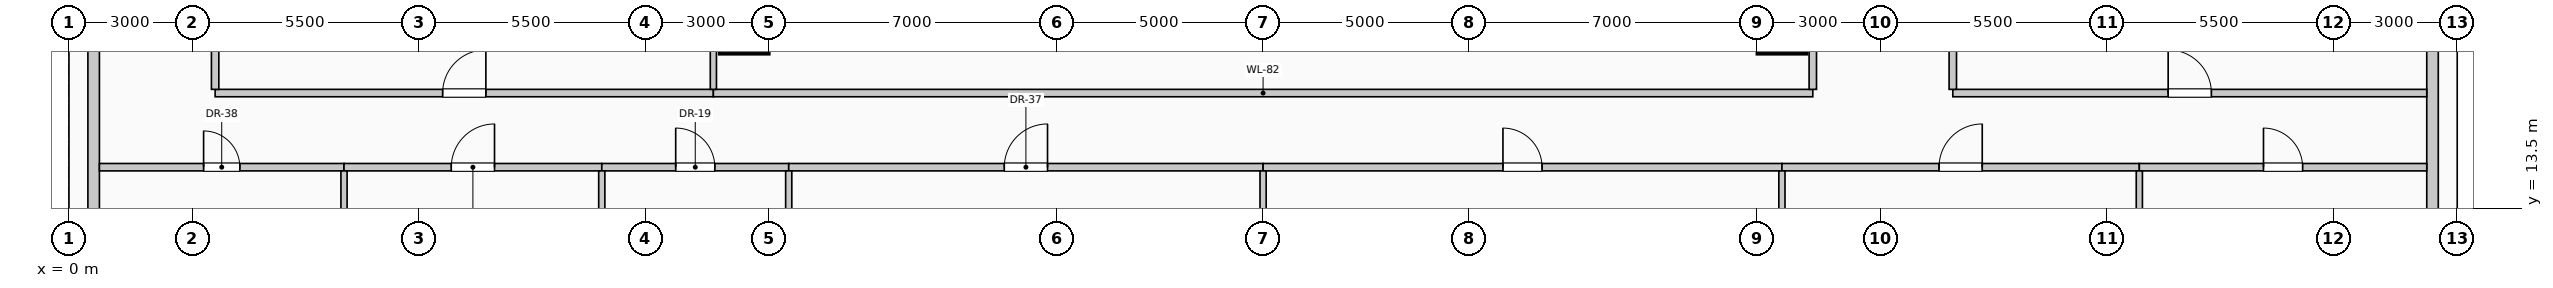
"""IFC4 building model, lengths in metres.
Left out: names, types, materials, properties, quantities, classifications, styles, units other than length and angle.
Written with IfcOpenShell. Run it as: python <this file> out.ifc"""

import sys

from ifc_helpers import new_model, si_unit, direction, frame, frame_2d, origin, origin_2d, place, context, subcontext, project, spatial, rectangle, extrude, element, fill, save


model = new_model("IFC4")
c1 = context("Model", 3, precision=1e-05, world=origin(), true_north=direction((0.0, 1.0)))
c2 = subcontext(c1, "Body", "Model", "MODEL_VIEW")
j1 = project(units=[si_unit("LENGTHUNIT", "METRE"), si_unit("PLANEANGLEUNIT", "RADIAN")], contexts=[c1])
p1 = place(None, origin())
s1 = spatial("IfcSite", under=j1, at=p1, CompositionType="ELEMENT")
p2 = place(p1, origin())
s2 = spatial("IfcBuilding", under=s1, at=p2, CompositionType="ELEMENT")
p3 = place(p2, frame((0.0, 0.0, 54.6)))
s3 = spatial("IfcBuildingStorey", under=s2, at=p3, CompositionType="ELEMENT", Elevation=54.6)
for number, where, z_axis, x_axis in (
    (1, (16.4, 18.0, 0.0), (0.0, 0.0, 1.0), (1.0, 0.0, 0.0)),
    (2, (41.6, 18.0, 0.0), (0.0, 0.0, 1.0), (1.0, 0.0, 0.0)),
):
    element("IfcColumn", number, at=place(p3, frame(where, z_axis=z_axis, x_axis=x_axis)), inside=s3, PredefinedType="COLUMN", context=c2, shape_type="SweptSolid", body=[
        extrude(rectangle(XDim=1.2, YDim=1.5, at=origin_2d()), origin(), (0.0, 0.0, 1.0), 4.0),
    ])
p4 = place(p3, frame((0.6, 10.47, 0.0), z_axis=(0.0, 0.0, 1.0), x_axis=(0.0, 1.0, 0.0)))
e3 = element("IfcWall", 3, at=p4, inside=s3, PredefinedType="SOLIDWALL", context=c2, shape_type="SweptSolid", body=[
    extrude(rectangle(XDim=7.06, YDim=0.28, at=frame_2d((3.53, 0.0))), origin(), (0.0, 0.0, 1.0), 2.85),
])
p5 = place(p4, frame((1.22, 0.0, 0.5)))
e4 = element("IfcOpeningElement", 4, at=p5, cuts=e3, PredefinedType="OPENING", context=c2, shape_type="SweptSolid", body=[
    extrude(rectangle(XDim=1.7, YDim=1.95, at=frame_2d((0.85, 0.975))), frame((0.0, 0.15, 0.0), z_axis=(0.0, -1.0, 0.0), x_axis=(1.0, 0.0, 0.0)), (0.0, 0.0, 1.0), 0.3),
])
p6 = place(p3, frame((57.4, 17.53, 0.0), z_axis=(0.0, 0.0, 1.0), x_axis=(0.0, -1.0, 0.0)))
e5 = element("IfcWall", 5, at=p6, inside=s3, PredefinedType="SOLIDWALL", context=c2, shape_type="SweptSolid", body=[
    extrude(rectangle(XDim=7.06, YDim=0.28, at=frame_2d((3.53, 0.0))), origin(), (0.0, 0.0, 1.0), 2.85),
])
p7 = place(p6, frame((4.14, 0.0, 0.5)))
e6 = element("IfcOpeningElement", 6, at=p7, cuts=e5, PredefinedType="OPENING", context=c2, shape_type="SweptSolid", body=[
    extrude(rectangle(XDim=1.7, YDim=1.95, at=frame_2d((0.85, 0.975))), frame((0.0, 0.15, 0.0), z_axis=(0.0, -1.0, 0.0), x_axis=(1.0, 0.0, 0.0)), (0.0, 0.0, 1.0), 0.3),
])
p8 = place(p3, frame((0.74, 14.5, 0.0), z_axis=(0.0, 0.0, 1.0), x_axis=(1.0, 0.0, 0.0)))
e7 = element("IfcWall", 7, at=p8, inside=s3, PredefinedType="PARTITIONING", context=c2, shape_type="SweptSolid", body=[
    extrude(rectangle(XDim=5.94, YDim=0.18, at=frame_2d((2.97, 0.0))), origin(), (0.0, 0.0, 1.0), 3.7),
])
p9 = place(p8, frame((2.53, 0.0, 0.0)))
e8 = element("IfcOpeningElement", 8, at=p9, cuts=e7, PredefinedType="OPENING", context=c2, shape_type="SweptSolid", body=[
    extrude(rectangle(XDim=0.88, YDim=2.1, at=frame_2d((0.44, 1.05))), frame((0.0, 0.1, 0.0), z_axis=(0.0, -1.0, 0.0), x_axis=(1.0, 0.0, 0.0)), (0.0, 0.0, 1.0), 0.2),
])
p10 = place(p3, frame((6.68, 14.5, 0.0), z_axis=(0.0, 0.0, 1.0), x_axis=(1.0, 0.0, 0.0)))
e9 = element("IfcWall", 9, at=p10, inside=s3, PredefinedType="PARTITIONING", context=c2, shape_type="SweptSolid", body=[
    extrude(rectangle(XDim=6.26, YDim=0.18, at=frame_2d((3.13, 0.0))), origin(), (0.0, 0.0, 1.0), 3.7),
])
p11 = place(p10, frame((2.605, 0.0, 0.0)))
e10 = element("IfcOpeningElement", 10, at=p11, cuts=e9, PredefinedType="OPENING", context=c2, shape_type="SweptSolid", body=[
    extrude(rectangle(XDim=1.05, YDim=2.15, at=frame_2d((0.525, 1.075))), frame((0.0, 0.1, 0.0), z_axis=(0.0, -1.0, 0.0), x_axis=(1.0, 0.0, 0.0)), (0.0, 0.0, 1.0), 0.2),
])
p12 = place(p3, frame((12.94, 14.5, 0.0), z_axis=(0.0, 0.0, 1.0), x_axis=(1.0, 0.0, 0.0)))
e11 = element("IfcWall", 11, at=p12, inside=s3, PredefinedType="PARTITIONING", context=c2, shape_type="SweptSolid", body=[
    extrude(rectangle(XDim=4.54, YDim=0.18, at=frame_2d((2.27, 0.0))), origin(), (0.0, 0.0, 1.0), 3.7),
])
p13 = place(p12, frame((1.795, 0.0, 0.0)))
e12 = element("IfcOpeningElement", 12, at=p13, cuts=e11, PredefinedType="OPENING", context=c2, shape_type="SweptSolid", body=[
    extrude(rectangle(XDim=0.95, YDim=2.15, at=frame_2d((0.475, 1.075))), frame((0.0, 0.1, 0.0), z_axis=(0.0, -1.0, 0.0), x_axis=(1.0, 0.0, 0.0)), (0.0, 0.0, 1.0), 0.2),
])
p14 = place(p3, frame((17.48, 14.5, 0.0), z_axis=(0.0, 0.0, 1.0), x_axis=(1.0, 0.0, 0.0)))
e13 = element("IfcWall", 13, at=p14, inside=s3, PredefinedType="PARTITIONING", context=c2, shape_type="SweptSolid", body=[
    extrude(rectangle(XDim=11.52, YDim=0.18, at=frame_2d((5.76, 0.0))), origin(), (0.0, 0.0, 1.0), 3.7),
])
p15 = place(p14, frame((5.235, 0.0, 0.0)))
e14 = element("IfcOpeningElement", 14, at=p15, cuts=e13, PredefinedType="OPENING", context=c2, shape_type="SweptSolid", body=[
    extrude(rectangle(XDim=1.05, YDim=2.15, at=frame_2d((0.525, 1.075))), frame((0.0, 0.1, 0.0), z_axis=(0.0, -1.0, 0.0), x_axis=(1.0, 0.0, 0.0)), (0.0, 0.0, 1.0), 0.2),
])
p16 = place(p3, frame((29.0, 14.5, 0.0), z_axis=(0.0, 0.0, 1.0), x_axis=(1.0, 0.0, 0.0)))
e15 = element("IfcWall", 15, at=p16, inside=s3, PredefinedType="PARTITIONING", context=c2, shape_type="SweptSolid", body=[
    extrude(rectangle(XDim=12.6, YDim=0.18, at=frame_2d((6.3, 0.0))), origin(), (0.0, 0.0, 1.0), 3.7),
])
p17 = place(p16, frame((5.825, 0.0, 0.0)))
e16 = element("IfcOpeningElement", 16, at=p17, cuts=e15, PredefinedType="OPENING", context=c2, shape_type="SweptSolid", body=[
    extrude(rectangle(XDim=0.95, YDim=2.15, at=frame_2d((0.475, 1.075))), frame((0.0, 0.1, 0.0), z_axis=(0.0, -1.0, 0.0), x_axis=(1.0, 0.0, 0.0)), (0.0, 0.0, 1.0), 0.2),
])
p18 = place(p3, frame((41.6, 14.5, 0.0), z_axis=(0.0, 0.0, 1.0), x_axis=(1.0, 0.0, 0.0)))
e17 = element("IfcWall", 17, at=p18, inside=s3, PredefinedType="PARTITIONING", context=c2, shape_type="SweptSolid", body=[
    extrude(rectangle(XDim=8.68, YDim=0.18, at=frame_2d((4.34, 0.0))), origin(), (0.0, 0.0, 1.0), 3.7),
])
p19 = place(p18, frame((3.815, 0.0, 0.0)))
e18 = element("IfcOpeningElement", 18, at=p19, cuts=e17, PredefinedType="OPENING", context=c2, shape_type="SweptSolid", body=[
    extrude(rectangle(XDim=1.05, YDim=2.15, at=frame_2d((0.525, 1.075))), frame((0.0, 0.1, 0.0), z_axis=(0.0, -1.0, 0.0), x_axis=(1.0, 0.0, 0.0)), (0.0, 0.0, 1.0), 0.2),
])
p20 = place(p3, frame((50.28, 14.5, 0.0), z_axis=(0.0, 0.0, 1.0), x_axis=(1.0, 0.0, 0.0)))
e19 = element("IfcWall", 19, at=p20, inside=s3, PredefinedType="PARTITIONING", context=c2, shape_type="SweptSolid", body=[
    extrude(rectangle(XDim=6.98, YDim=0.18, at=frame_2d((3.49, 0.0))), origin(), (0.0, 0.0, 1.0), 3.7),
])
p21 = place(p20, frame((3.015, 0.0, 0.0)))
e20 = element("IfcOpeningElement", 20, at=p21, cuts=e19, PredefinedType="OPENING", context=c2, shape_type="SweptSolid", body=[
    extrude(rectangle(XDim=0.95, YDim=2.15, at=frame_2d((0.475, 1.075))), frame((0.0, 0.1, 0.0), z_axis=(0.0, -1.0, 0.0), x_axis=(1.0, 0.0, 0.0)), (0.0, 0.0, 1.0), 0.2),
])
p22 = place(p3, frame((3.55, 16.3, 0.0), z_axis=(0.0, 0.0, 1.0), x_axis=(1.0, 0.0, 0.0)))
e21 = element("IfcWall", 21, at=p22, inside=s3, PredefinedType="PARTITIONING", context=c2, shape_type="SweptSolid", body=[
    extrude(rectangle(XDim=12.1, YDim=0.18, at=frame_2d((6.05, 0.0))), origin(), (0.0, 0.0, 1.0), 3.7),
])
p23 = place(p22, frame((5.525, 0.0, 0.0)))
e22 = element("IfcOpeningElement", 22, at=p23, cuts=e21, PredefinedType="OPENING", context=c2, shape_type="SweptSolid", body=[
    extrude(rectangle(XDim=1.05, YDim=2.15, at=frame_2d((0.525, 1.075))), frame((0.0, 0.1, 0.0), z_axis=(0.0, -1.0, 0.0), x_axis=(1.0, 0.0, 0.0)), (0.0, 0.0, 1.0), 0.2),
])
p24 = place(p3, frame((15.65, 16.3, 0.0), z_axis=(0.0, 0.0, 1.0), x_axis=(1.0, 0.0, 0.0)))
e23 = element("IfcWall", 23, at=p24, inside=s3, PredefinedType="PARTITIONING", context=c2, shape_type="SweptSolid", body=[
    extrude(rectangle(XDim=26.7, YDim=0.18, at=frame_2d((13.35, 0.0))), origin(), (0.0, 0.0, 1.0), 3.7),
])
p25 = place(p3, frame((45.75, 16.3, 0.0), z_axis=(0.0, 0.0, 1.0), x_axis=(1.0, 0.0, 0.0)))
e24 = element("IfcWall", 24, at=p25, inside=s3, PredefinedType="PARTITIONING", context=c2, shape_type="SweptSolid", body=[
    extrude(rectangle(XDim=11.51, YDim=0.18, at=frame_2d((5.755, 0.0))), origin(), (0.0, 0.0, 1.0), 3.7),
])
p26 = place(p25, frame((5.23, 0.0, 0.0)))
e25 = element("IfcOpeningElement", 25, at=p26, cuts=e24, PredefinedType="OPENING", context=c2, shape_type="SweptSolid", body=[
    extrude(rectangle(XDim=1.05, YDim=2.15, at=frame_2d((0.525, 1.075))), frame((0.0, 0.1, 0.0), z_axis=(0.0, -1.0, 0.0), x_axis=(1.0, 0.0, 0.0)), (0.0, 0.0, 1.0), 0.2),
])
p27 = place(p3, frame((3.55, 16.39, 0.0), z_axis=(0.0, 0.0, 1.0), x_axis=(0.0, 1.0, 0.0)))
e26 = element("IfcWall", 26, at=p27, inside=s3, PredefinedType="PARTITIONING", context=c2, shape_type="SweptSolid", body=[
    extrude(rectangle(XDim=3.17, YDim=0.18, at=frame_2d((1.585, 0.0))), origin(), (0.0, 0.0, 1.0), 3.7),
])
for number, where, z_axis, x_axis in (
    (27, (6.68, 0.74, 0.0), (0.0, 0.0, 1.0), (0.0, 1.0, 0.0)),
    (28, (12.94, 0.74, 0.0), (0.0, 0.0, 1.0), (0.0, 1.0, 0.0)),
):
    element("IfcWall", number, at=place(p3, frame(where, z_axis=z_axis, x_axis=x_axis)), inside=s3, PredefinedType="PARTITIONING", context=c2, shape_type="SweptSolid", body=[
        extrude(rectangle(XDim=13.67, YDim=0.15, at=frame_2d((6.835, 0.0))), origin(), (0.0, 0.0, 1.0), 3.7),
    ])
p28 = place(p3, frame((15.65, 16.39, 0.0), z_axis=(0.0, 0.0, 1.0), x_axis=(0.0, 1.0, 0.0)))
e29 = element("IfcWall", 29, at=p28, inside=s3, PredefinedType="PARTITIONING", context=c2, shape_type="SweptSolid", body=[
    extrude(rectangle(XDim=3.17, YDim=0.15, at=frame_2d((1.585, 0.0))), origin(), (0.0, 0.0, 1.0), 3.7),
])
p29 = place(p3, frame((17.48, 0.74, 0.0), z_axis=(0.0, 0.0, 1.0), x_axis=(0.0, 1.0, 0.0)))
e30 = element("IfcWall", 30, at=p29, inside=s3, PredefinedType="PARTITIONING", context=c2, shape_type="SweptSolid", body=[
    extrude(rectangle(XDim=13.67, YDim=0.15, at=frame_2d((6.835, 0.0))), origin(), (0.0, 0.0, 1.0), 3.7),
])
p30 = place(p3, frame((29.0, 1.2, 0.0), z_axis=(0.0, 0.0, 1.0), x_axis=(0.0, 1.0, 0.0)))
e31 = element("IfcWall", 31, at=p30, inside=s3, PredefinedType="PARTITIONING", context=c2, shape_type="SweptSolid", body=[
    extrude(rectangle(XDim=13.21, YDim=0.15, at=frame_2d((6.605, 0.0))), origin(), (0.0, 0.0, 1.0), 2.995),
])
p31 = place(p3, frame((41.6, 10.75, 0.0), z_axis=(0.0, 0.0, 1.0), x_axis=(0.0, 1.0, 0.0)))
e32 = element("IfcWall", 32, at=p31, inside=s3, PredefinedType="PARTITIONING", context=c2, shape_type="SweptSolid", body=[
    extrude(rectangle(XDim=3.66, YDim=0.15, at=frame_2d((1.83, 0.0))), origin(), (0.0, 0.0, 1.0), 2.995),
])
for number, where, z_axis, x_axis in (
    (33, (42.35, 16.39, 0.0), (0.0, 0.0, 1.0), (0.0, 1.0, 0.0)),
    (34, (45.75, 16.39, 0.0), (0.0, 0.0, 1.0), (0.0, 1.0, 0.0)),
):
    element("IfcWall", number, at=place(p3, frame(where, z_axis=z_axis, x_axis=x_axis)), inside=s3, PredefinedType="PARTITIONING", context=c2, shape_type="SweptSolid", body=[
        extrude(rectangle(XDim=3.17, YDim=0.18, at=frame_2d((1.585, 0.0))), origin(), (0.0, 0.0, 1.0), 3.7),
    ])
p32 = place(p3, frame((50.28, 0.74, 0.0), z_axis=(0.0, 0.0, 1.0), x_axis=(0.0, 1.0, 0.0)))
e35 = element("IfcWall", 35, at=p32, inside=s3, PredefinedType="PARTITIONING", context=c2, shape_type="SweptSolid", body=[
    extrude(rectangle(XDim=13.67, YDim=0.15, at=frame_2d((6.835, 0.0))), origin(), (0.0, 0.0, 1.0), 3.7),
])
p33 = place(p9, origin())
e36 = element("IfcDoor", 36, at=p33, inside=s3, OperationType="SINGLE_SWING_LEFT", PredefinedType="DOOR", context=c2, shape_type="SweptSolid", body=[
    extrude(rectangle(XDim=0.88, YDim=2.1, at=frame_2d((0.44, 1.05))), frame((0.0, 0.025, 0.0), z_axis=(0.0, -1.0, 0.0), x_axis=(1.0, 0.0, 0.0)), (0.0, 0.0, 1.0), 0.05),
])
fill(e8, e36)
p34 = place(p11, origin())
e37 = element("IfcDoor", 37, at=p34, inside=s3, OperationType="SINGLE_SWING_RIGHT", PredefinedType="DOOR", context=c2, shape_type="SweptSolid", body=[
    extrude(rectangle(XDim=1.05, YDim=2.15, at=frame_2d((0.525, 1.075))), frame((0.0, 0.025, 0.0), z_axis=(0.0, -1.0, 0.0), x_axis=(1.0, 0.0, 0.0)), (0.0, 0.0, 1.0), 0.05),
])
fill(e10, e37)
p35 = place(p13, origin())
e38 = element("IfcDoor", 38, at=p35, inside=s3, OperationType="SINGLE_SWING_LEFT", PredefinedType="DOOR", context=c2, shape_type="SweptSolid", body=[
    extrude(rectangle(XDim=0.95, YDim=2.15, at=frame_2d((0.475, 1.075))), frame((0.0, 0.025, 0.0), z_axis=(0.0, -1.0, 0.0), x_axis=(1.0, 0.0, 0.0)), (0.0, 0.0, 1.0), 0.05),
])
fill(e12, e38)
p36 = place(p15, origin())
e39 = element("IfcDoor", 39, at=p36, inside=s3, OperationType="SINGLE_SWING_RIGHT", PredefinedType="DOOR", context=c2, shape_type="SweptSolid", body=[
    extrude(rectangle(XDim=1.05, YDim=2.15, at=frame_2d((0.525, 1.075))), frame((0.0, 0.025, 0.0), z_axis=(0.0, -1.0, 0.0), x_axis=(1.0, 0.0, 0.0)), (0.0, 0.0, 1.0), 0.05),
])
fill(e14, e39)
p37 = place(p17, origin())
e40 = element("IfcDoor", 40, at=p37, inside=s3, OperationType="SINGLE_SWING_LEFT", PredefinedType="DOOR", context=c2, shape_type="SweptSolid", body=[
    extrude(rectangle(XDim=0.95, YDim=2.15, at=frame_2d((0.475, 1.075))), frame((0.0, 0.025, 0.0), z_axis=(0.0, -1.0, 0.0), x_axis=(1.0, 0.0, 0.0)), (0.0, 0.0, 1.0), 0.05),
])
fill(e16, e40)
p38 = place(p19, origin())
e41 = element("IfcDoor", 41, at=p38, inside=s3, OperationType="SINGLE_SWING_RIGHT", PredefinedType="DOOR", context=c2, shape_type="SweptSolid", body=[
    extrude(rectangle(XDim=1.05, YDim=2.15, at=frame_2d((0.525, 1.075))), frame((0.0, 0.025, 0.0), z_axis=(0.0, -1.0, 0.0), x_axis=(1.0, 0.0, 0.0)), (0.0, 0.0, 1.0), 0.05),
])
fill(e18, e41)
p39 = place(p21, origin())
e42 = element("IfcDoor", 42, at=p39, inside=s3, OperationType="SINGLE_SWING_LEFT", PredefinedType="DOOR", context=c2, shape_type="SweptSolid", body=[
    extrude(rectangle(XDim=0.95, YDim=2.15, at=frame_2d((0.475, 1.075))), frame((0.0, 0.025, 0.0), z_axis=(0.0, -1.0, 0.0), x_axis=(1.0, 0.0, 0.0)), (0.0, 0.0, 1.0), 0.05),
])
fill(e20, e42)
p40 = place(p23, origin())
e43 = element("IfcDoor", 43, at=p40, inside=s3, OperationType="SINGLE_SWING_RIGHT", PredefinedType="DOOR", context=c2, shape_type="SweptSolid", body=[
    extrude(rectangle(XDim=1.05, YDim=2.15, at=frame_2d((0.525, 1.075))), frame((0.0, 0.025, 0.0), z_axis=(0.0, -1.0, 0.0), x_axis=(1.0, 0.0, 0.0)), (0.0, 0.0, 1.0), 0.05),
])
fill(e22, e43)
p41 = place(p26, origin())
e44 = element("IfcDoor", 44, at=p41, inside=s3, OperationType="SINGLE_SWING_LEFT", PredefinedType="DOOR", context=c2, shape_type="SweptSolid", body=[
    extrude(rectangle(XDim=1.05, YDim=2.15, at=frame_2d((0.525, 1.075))), frame((0.0, 0.025, 0.0), z_axis=(0.0, -1.0, 0.0), x_axis=(1.0, 0.0, 0.0)), (0.0, 0.0, 1.0), 0.05),
])
fill(e25, e44)
save(model, sys.argv[1])
